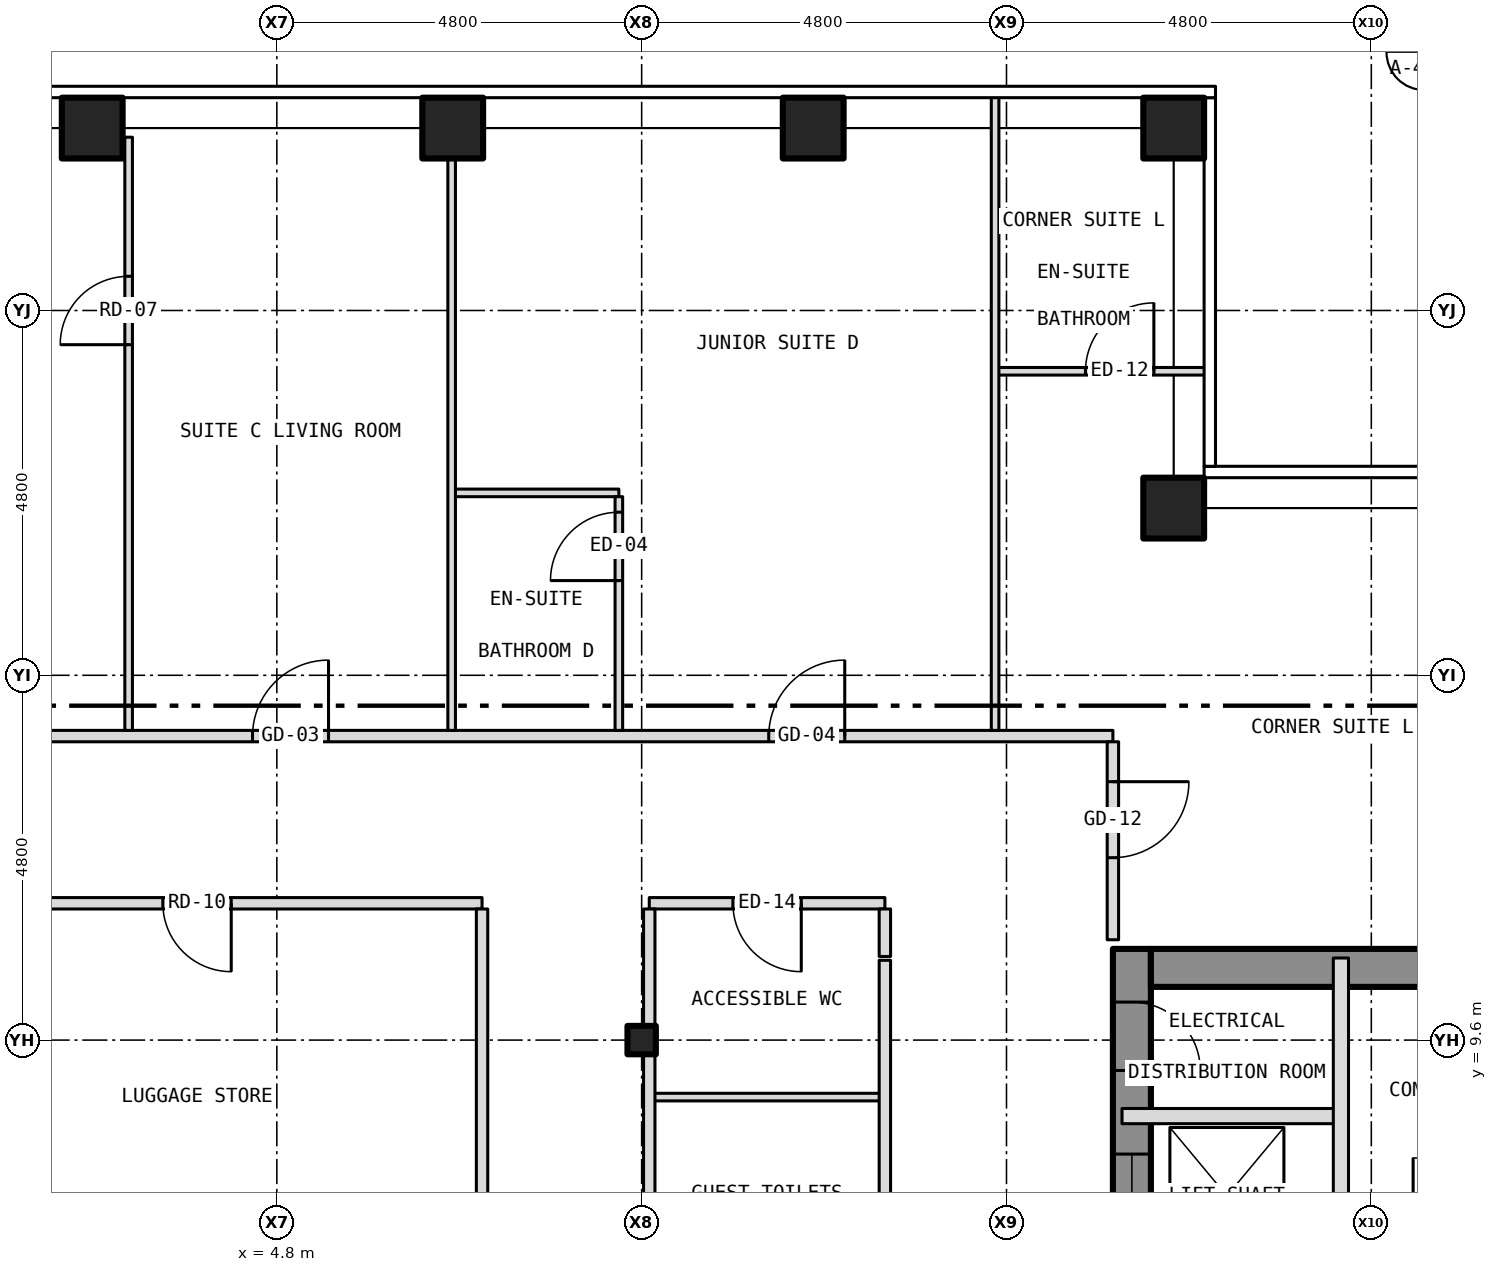
"""IFC4 building model, lengths in metres.
Left out: names, types, materials, properties, quantities, classifications, styles, units other than length and angle.
Written with IfcOpenShell. Run it as: python <this file> out.ifc"""

import sys

from ifc_helpers import new_model, si_unit, direction, frame, frame_2d, origin, origin_2d, place, context, subcontext, project, spatial, rectangle, hollow_rectangle, i_section, extrude, element, fill, save


model = new_model("IFC4")
c1 = context("Model", 3, precision=1e-05, world=origin(), true_north=direction((0.0, 1.0)))
c2 = subcontext(c1, "Body", "Model", "MODEL_VIEW")
j1 = project(units=[si_unit("LENGTHUNIT", "METRE"), si_unit("PLANEANGLEUNIT", "RADIAN")], contexts=[c1])
p1 = place(None, origin())
s1 = spatial("IfcSite", under=j1, at=p1, CompositionType="ELEMENT")
p2 = place(p1, origin())
s2 = spatial("IfcBuilding", under=s1, at=p2, CompositionType="ELEMENT")
p3 = place(p2, frame((0.0, 0.0, 172.5)))
s3 = spatial("IfcBuildingStorey", under=s2, at=p3, CompositionType="ELEMENT", Elevation=172.5)
for number, where, z_axis, x_axis in (
    (1, (2.371, 21.6, -0.15), (0.0, 0.0, 1.0), (1.0, 0.0, 0.0)),
    (2, (7.114, 21.6, -0.15), (0.0, 0.0, 1.0), (1.0, 0.0, 0.0)),
    (3, (11.857, 21.6, -0.15), (0.0, 0.0, 1.0), (1.0, 0.0, 0.0)),
    (4, (16.6, 21.6, -0.15), (0.0, 0.0, 1.0), (1.0, 0.0, 0.0)),
    (5, (16.6, 16.6, -0.15), (0.0, 0.0, 1.0), (1.0, 0.0, 0.0)),
):
    element("IfcColumn", number, at=place(p3, frame(where, z_axis=z_axis, x_axis=x_axis)), inside=s3, PredefinedType="COLUMN", context=c2, shape_type="SweptSolid", body=[
        extrude(hollow_rectangle(XDim=0.8, YDim=0.8, WallThickness=0.045, at=origin_2d()), origin(), (0.0, 0.0, 1.0), 3.5),
    ])
p4 = place(p3, frame((9.6, 9.6, -0.15), z_axis=(0.0, 0.0, 1.0), x_axis=(1.0, 0.0, 0.0)))
e6 = element("IfcColumn", 6, at=p4, inside=s3, PredefinedType="COLUMN", context=c2, shape_type="SweptSolid", body=[
    extrude(i_section(OverallWidth=0.373, OverallDepth=0.373, WebThickness=0.016, FlangeThickness=0.026, at=origin_2d()), origin(), (0.0, 0.0, 1.0), 3.5),
])
p5 = place(p3, frame((16.05, -10.8, 0.0), z_axis=(0.0, 0.0, 1.0), x_axis=(0.0, 1.0, 0.0)))
e7 = element("IfcWall", 7, at=p5, inside=s3, PredefinedType="SHEAR", context=c2, shape_type="SweptSolid", body=[
    extrude(rectangle(XDim=21.6, YDim=0.5, at=frame_2d((10.8, 0.0))), origin(), (0.0, 0.0, 1.0), 3.25),
])
p6 = place(p5, frame((9.4, 0.0, 0.0)))
e8 = element("IfcOpeningElement", 8, at=p6, cuts=e7, PredefinedType="OPENING", context=c2, shape_type="SweptSolid", body=[
    extrude(rectangle(XDim=1.1, YDim=2.1, at=frame_2d((0.55, 1.05))), frame((0.0, 0.262, 0.0), z_axis=(0.0, -1.0, 0.0), x_axis=(1.0, 0.0, 0.0)), (0.0, 0.0, 1.0), 0.524),
])
p7 = place(p5, frame((11.5, 0.0, 0.0)))
e9 = element("IfcOpeningElement", 9, at=p7, cuts=e7, PredefinedType="OPENING", context=c2, shape_type="SweptSolid", body=[
    extrude(rectangle(XDim=1.1, YDim=2.1, at=frame_2d((0.55, 1.05))), frame((0.0, 0.262, 0.0), z_axis=(0.0, -1.0, 0.0), x_axis=(1.0, 0.0, 0.0)), (0.0, 0.0, 1.0), 0.524),
])
p8 = place(p5, frame((13.6, 0.0, 0.0)))
e10 = element("IfcOpeningElement", 10, at=p8, cuts=e7, PredefinedType="OPENING", context=c2, shape_type="SweptSolid", body=[
    extrude(rectangle(XDim=1.1, YDim=2.1, at=frame_2d((0.55, 1.05))), frame((0.0, 0.262, 0.0), z_axis=(0.0, -1.0, 0.0), x_axis=(1.0, 0.0, 0.0)), (0.0, 0.0, 1.0), 0.524),
])
p9 = place(p5, frame((15.7, 0.0, 0.0)))
e11 = element("IfcOpeningElement", 11, at=p9, cuts=e7, PredefinedType="OPENING", context=c2, shape_type="SweptSolid", body=[
    extrude(rectangle(XDim=1.1, YDim=2.1, at=frame_2d((0.55, 1.05))), frame((0.0, 0.262, 0.0), z_axis=(0.0, -1.0, 0.0), x_axis=(1.0, 0.0, 0.0)), (0.0, 0.0, 1.0), 0.524),
])
p10 = place(p5, frame((17.8, 0.0, 0.0)))
e12 = element("IfcOpeningElement", 12, at=p10, cuts=e7, PredefinedType="OPENING", context=c2, shape_type="SweptSolid", body=[
    extrude(rectangle(XDim=1.1, YDim=2.1, at=frame_2d((0.55, 1.05))), frame((0.0, 0.262, 0.0), z_axis=(0.0, -1.0, 0.0), x_axis=(1.0, 0.0, 0.0)), (0.0, 0.0, 1.0), 0.524),
])
p11 = place(p5, frame((5.642, 0.0, 0.0)))
e13 = element("IfcOpeningElement", 13, at=p11, cuts=e7, PredefinedType="OPENING", context=c2, shape_type="SweptSolid", body=[
    extrude(rectangle(XDim=1.1, YDim=2.1, at=frame_2d((0.55, 1.05))), frame((0.0, 0.262, 0.0), z_axis=(0.0, -1.0, 0.0), x_axis=(1.0, 0.0, 0.0)), (0.0, 0.0, 1.0), 0.524),
])
p12 = place(p5, frame((7.5, 0.0, 0.0)))
e14 = element("IfcOpeningElement", 14, at=p12, cuts=e7, PredefinedType="OPENING", context=c2, shape_type="SweptSolid", body=[
    extrude(rectangle(XDim=1.1, YDim=2.1, at=frame_2d((0.55, 1.05))), frame((0.0, 0.262, 0.0), z_axis=(0.0, -1.0, 0.0), x_axis=(1.0, 0.0, 0.0)), (0.0, 0.0, 1.0), 0.524),
])
p13 = place(p5, frame((20.0, 0.0, 0.0)))
e15 = element("IfcOpeningElement", 15, at=p13, cuts=e7, PredefinedType="OPENING", context=c2, shape_type="SweptSolid", body=[
    extrude(rectangle(XDim=0.9, YDim=2.1, at=frame_2d((0.45, 1.05))), frame((0.0, 0.262, 0.0), z_axis=(0.0, -1.0, 0.0), x_axis=(1.0, 0.0, 0.0)), (0.0, 0.0, 1.0), 0.524),
])
p14 = place(p3, frame((16.3, 10.55, 0.0), z_axis=(0.0, 0.0, 1.0), x_axis=(1.0, 0.0, 0.0)))
e16 = element("IfcWall", 16, at=p14, inside=s3, PredefinedType="SHEAR", context=c2, shape_type="SweptSolid", body=[
    extrude(rectangle(XDim=4.8, YDim=0.5, at=frame_2d((2.4, 0.0))), origin(), (0.0, 0.0, 1.0), 3.25),
])
p15 = place(p3, frame((15.92, 8.6, 0.0), z_axis=(0.0, 0.0, 1.0), x_axis=(1.0, 0.0, 0.0)))
e17 = element("IfcWall", 17, at=p15, inside=s3, PredefinedType="PARTITIONING", context=c2, shape_type="SweptSolid", body=[
    extrude(rectangle(XDim=2.88, YDim=0.2, at=frame_2d((1.44, 0.0))), origin(), (0.0, 0.0, 1.0), 3.25),
])
p16 = place(p3, frame((9.7, 8.85, 0.0), z_axis=(0.0, 0.0, 1.0), x_axis=(1.0, 0.0, 0.0)))
e18 = element("IfcWall", 18, at=p16, inside=s3, PredefinedType="PARTITIONING", context=c2, shape_type="SweptSolid", body=[
    extrude(rectangle(XDim=3.1, YDim=0.1, at=frame_2d((1.55, 0.0))), origin(), (0.0, 0.0, 1.0), 3.35),
])
p17 = place(p3, frame((-12.8, 11.4, 0.0), z_axis=(0.0, 0.0, 1.0), x_axis=(1.0, 0.0, 0.0)))
e19 = element("IfcWall", 19, at=p17, inside=s3, PredefinedType="PARTITIONING", context=c2, shape_type="SweptSolid", body=[
    extrude(rectangle(XDim=20.3, YDim=0.15, at=frame_2d((10.15, 0.0))), origin(), (0.0, 0.0, 1.0), 3.35),
])
p18 = place(p17, frame((1.15, 0.0, 0.0)))
e20 = element("IfcOpeningElement", 20, at=p18, cuts=e19, PredefinedType="OPENING", context=c2, shape_type="SweptSolid", body=[
    extrude(rectangle(XDim=0.9, YDim=2.1, at=frame_2d((0.45, 1.05))), frame((0.0, 0.087, 0.0), z_axis=(0.0, -1.0, 0.0), x_axis=(1.0, 0.0, 0.0)), (0.0, 0.0, 1.0), 0.174),
])
p19 = place(p17, frame((16.1, 0.0, 0.0)))
e21 = element("IfcOpeningElement", 21, at=p19, cuts=e19, PredefinedType="OPENING", context=c2, shape_type="SweptSolid", body=[
    extrude(rectangle(XDim=0.9, YDim=2.1, at=frame_2d((0.45, 1.05))), frame((0.0, 0.087, 0.0), z_axis=(0.0, -1.0, 0.0), x_axis=(1.0, 0.0, 0.0)), (0.0, 0.0, 1.0), 0.174),
])
p20 = place(p17, frame((7.55, 0.0, 0.0)))
e22 = element("IfcOpeningElement", 22, at=p20, cuts=e19, PredefinedType="OPENING", context=c2, shape_type="SweptSolid", body=[
    extrude(rectangle(XDim=0.9, YDim=2.1, at=frame_2d((0.45, 1.05))), frame((0.0, 0.087, 0.0), z_axis=(0.0, -1.0, 0.0), x_axis=(1.0, 0.0, 0.0)), (0.0, 0.0, 1.0), 0.174),
])
p21 = place(p3, frame((9.7, 11.4, 0.0), z_axis=(0.0, 0.0, 1.0), x_axis=(1.0, 0.0, 0.0)))
e23 = element("IfcWall", 23, at=p21, inside=s3, PredefinedType="PARTITIONING", context=c2, shape_type="SweptSolid", body=[
    extrude(rectangle(XDim=3.1, YDim=0.15, at=frame_2d((1.55, 0.0))), origin(), (0.0, 0.0, 1.0), 3.35),
])
p22 = place(p21, frame((1.1, 0.0, 0.0)))
e24 = element("IfcOpeningElement", 24, at=p22, cuts=e23, PredefinedType="OPENING", context=c2, shape_type="SweptSolid", body=[
    extrude(rectangle(XDim=0.9, YDim=2.1, at=frame_2d((0.45, 1.05))), frame((0.0, 0.087, 0.0), z_axis=(0.0, -1.0, 0.0), x_axis=(1.0, 0.0, 0.0)), (0.0, 0.0, 1.0), 0.174),
])
p23 = place(p3, frame((-15.8, 13.6, 0.0), z_axis=(0.0, 0.0, 1.0), x_axis=(1.0, 0.0, 0.0)))
e25 = element("IfcWall", 25, at=p23, inside=s3, PredefinedType="PARTITIONING", context=c2, shape_type="SweptSolid", body=[
    extrude(rectangle(XDim=31.6, YDim=0.15, at=frame_2d((15.8, 0.0))), origin(), (0.0, 0.0, 1.0), 3.35),
])
p24 = place(p23, frame((4.543, 0.0, 0.0)))
e26 = element("IfcOpeningElement", 26, at=p24, cuts=e25, PredefinedType="OPENING", context=c2, shape_type="SweptSolid", body=[
    extrude(rectangle(XDim=1.0, YDim=2.1, at=frame_2d((0.5, 1.05))), frame((0.0, 0.087, 0.0), z_axis=(0.0, -1.0, 0.0), x_axis=(1.0, 0.0, 0.0)), (0.0, 0.0, 1.0), 0.174),
])
p25 = place(p23, frame((8.271, 0.0, 0.0)))
e27 = element("IfcOpeningElement", 27, at=p25, cuts=e25, PredefinedType="OPENING", context=c2, shape_type="SweptSolid", body=[
    extrude(rectangle(XDim=1.0, YDim=2.1, at=frame_2d((0.5, 1.05))), frame((0.0, 0.087, 0.0), z_axis=(0.0, -1.0, 0.0), x_axis=(1.0, 0.0, 0.0)), (0.0, 0.0, 1.0), 0.174),
])
p26 = place(p23, frame((20.28, 0.0, 0.0)))
e28 = element("IfcOpeningElement", 28, at=p26, cuts=e25, PredefinedType="OPENING", context=c2, shape_type="SweptSolid", body=[
    extrude(rectangle(XDim=1.0, YDim=2.1, at=frame_2d((0.5, 1.05))), frame((0.0, 0.087, 0.0), z_axis=(0.0, -1.0, 0.0), x_axis=(1.0, 0.0, 0.0)), (0.0, 0.0, 1.0), 0.174),
])
p27 = place(p23, frame((27.072, 0.0, 0.0)))
e29 = element("IfcOpeningElement", 29, at=p27, cuts=e25, PredefinedType="OPENING", context=c2, shape_type="SweptSolid", body=[
    extrude(rectangle(XDim=1.0, YDim=2.1, at=frame_2d((0.5, 1.05))), frame((0.0, 0.087, 0.0), z_axis=(0.0, -1.0, 0.0), x_axis=(1.0, 0.0, 0.0)), (0.0, 0.0, 1.0), 0.174),
])
p28 = place(p3, frame((7.1, 16.8, 0.0), z_axis=(0.0, 0.0, 1.0), x_axis=(1.0, 0.0, 0.0)))
e30 = element("IfcWall", 30, at=p28, inside=s3, PredefinedType="PARTITIONING", context=c2, shape_type="SweptSolid", body=[
    extrude(rectangle(XDim=2.2, YDim=0.1, at=frame_2d((1.1, 0.0))), origin(), (0.0, 0.0, 1.0), 3.35),
])
p29 = place(p3, frame((14.25, 18.4, 0.0), z_axis=(0.0, 0.0, 1.0), x_axis=(1.0, 0.0, 0.0)))
e31 = element("IfcWall", 31, at=p29, inside=s3, PredefinedType="PARTITIONING", context=c2, shape_type="SweptSolid", body=[
    extrude(rectangle(XDim=2.78, YDim=0.1, at=frame_2d((1.39, 0.0))), origin(), (0.0, 0.0, 1.0), 3.35),
])
p30 = place(p29, frame((1.189, 0.0, 0.0)))
e32 = element("IfcOpeningElement", 32, at=p30, cuts=e31, PredefinedType="OPENING", context=c2, shape_type="SweptSolid", body=[
    extrude(rectangle(XDim=0.9, YDim=2.1, at=frame_2d((0.45, 1.05))), frame((0.0, 0.062, 0.0), z_axis=(0.0, -1.0, 0.0), x_axis=(1.0, 0.0, 0.0)), (0.0, 0.0, 1.0), 0.124),
])
p31 = place(p3, frame((2.85, 13.675, 0.0), z_axis=(0.0, 0.0, 1.0), x_axis=(0.0, 1.0, 0.0)))
e33 = element("IfcWall", 33, at=p31, inside=s3, PredefinedType="PARTITIONING", context=c2, shape_type="SweptSolid", body=[
    extrude(rectangle(XDim=7.805, YDim=0.1, at=frame_2d((3.902, 0.0))), origin(), (0.0, 0.0, 1.0), 3.35),
])
p32 = place(p31, frame((5.075, 0.0, 0.0)))
e34 = element("IfcOpeningElement", 34, at=p32, cuts=e33, PredefinedType="OPENING", context=c2, shape_type="SweptSolid", body=[
    extrude(rectangle(XDim=0.9, YDim=2.1, at=frame_2d((0.45, 1.05))), frame((0.0, 0.062, 0.0), z_axis=(0.0, -1.0, 0.0), x_axis=(1.0, 0.0, 0.0)), (0.0, 0.0, 1.0), 0.124),
])
p33 = place(p3, frame((7.1, 13.675, 0.0), z_axis=(0.0, 0.0, 1.0), x_axis=(0.0, 1.0, 0.0)))
e35 = element("IfcWall", 35, at=p33, inside=s3, PredefinedType="PARTITIONING", context=c2, shape_type="SweptSolid", body=[
    extrude(rectangle(XDim=7.805, YDim=0.1, at=frame_2d((3.902, 0.0))), origin(), (0.0, 0.0, 1.0), 3.35),
])
p34 = place(p3, frame((7.5, 6.375, 0.0), z_axis=(0.0, 0.0, 1.0), x_axis=(0.0, 1.0, 0.0)))
e36 = element("IfcWall", 36, at=p34, inside=s3, PredefinedType="PARTITIONING", context=c2, shape_type="SweptSolid", body=[
    extrude(rectangle(XDim=4.95, YDim=0.15, at=frame_2d((2.475, 0.0))), origin(), (0.0, 0.0, 1.0), 3.35),
])
p35 = place(p3, frame((9.3, 13.675, 0.0), z_axis=(0.0, 0.0, 1.0), x_axis=(0.0, 1.0, 0.0)))
e37 = element("IfcWall", 37, at=p35, inside=s3, PredefinedType="PARTITIONING", context=c2, shape_type="SweptSolid", body=[
    extrude(rectangle(XDim=3.075, YDim=0.1, at=frame_2d((1.538, 0.0))), origin(), (0.0, 0.0, 1.0), 3.35),
])
p36 = place(p35, frame((1.971, 0.0, 0.0)))
e38 = element("IfcOpeningElement", 38, at=p36, cuts=e37, PredefinedType="OPENING", context=c2, shape_type="SweptSolid", body=[
    extrude(rectangle(XDim=0.9, YDim=2.1, at=frame_2d((0.45, 1.05))), frame((0.0, 0.062, 0.0), z_axis=(0.0, -1.0, 0.0), x_axis=(1.0, 0.0, 0.0)), (0.0, 0.0, 1.0), 0.124),
])
p37 = place(p3, frame((9.7, 6.375, 0.0), z_axis=(0.0, 0.0, 1.0), x_axis=(0.0, 1.0, 0.0)))
e39 = element("IfcWall", 39, at=p37, inside=s3, PredefinedType="PARTITIONING", context=c2, shape_type="SweptSolid", body=[
    extrude(rectangle(XDim=3.038, YDim=0.15, at=frame_2d((1.519, 0.0))), origin(), (0.0, 0.0, 1.0), 2.728),
])
p38 = place(p3, frame((9.7, 9.413, 0.0), z_axis=(0.0, 0.0, 1.0), x_axis=(0.0, 1.0, 0.0)))
e40 = element("IfcWall", 40, at=p38, inside=s3, PredefinedType="PARTITIONING", context=c2, shape_type="SweptSolid", body=[
    extrude(rectangle(XDim=0.374, YDim=0.15, at=frame_2d((0.187, 0.0))), origin(), (0.0, 0.0, 1.0), 3.35),
])
p39 = place(p3, frame((9.7, 9.787, 0.0), z_axis=(0.0, 0.0, 1.0), x_axis=(0.0, 1.0, 0.0)))
e41 = element("IfcWall", 41, at=p39, inside=s3, PredefinedType="PARTITIONING", context=c2, shape_type="SweptSolid", body=[
    extrude(rectangle(XDim=1.538, YDim=0.15, at=frame_2d((0.769, 0.0))), origin(), (0.0, 0.0, 1.0), 2.728),
])
p40 = place(p3, frame((12.8, 6.35, 0.0), z_axis=(0.0, 0.0, 1.0), x_axis=(0.0, 1.0, 0.0)))
e42 = element("IfcWall", 42, at=p40, inside=s3, PredefinedType="PARTITIONING", context=c2, shape_type="SweptSolid", body=[
    extrude(rectangle(XDim=4.3, YDim=0.15, at=frame_2d((2.15, 0.0))), origin(), (0.0, 0.0, 1.0), 3.35),
])
p41 = place(p3, frame((12.8, 10.7, 0.0), z_axis=(0.0, 0.0, 1.0), x_axis=(0.0, 1.0, 0.0)))
e43 = element("IfcWall", 43, at=p41, inside=s3, PredefinedType="PARTITIONING", context=c2, shape_type="SweptSolid", body=[
    extrude(rectangle(XDim=0.625, YDim=0.15, at=frame_2d((0.312, 0.0))), origin(), (0.0, 0.0, 1.0), 3.35),
])
p42 = place(p3, frame((14.25, 13.675, 0.0), z_axis=(0.0, 0.0, 1.0), x_axis=(0.0, 1.0, 0.0)))
e44 = element("IfcWall", 44, at=p42, inside=s3, PredefinedType="PARTITIONING", context=c2, shape_type="SweptSolid", body=[
    extrude(rectangle(XDim=8.355, YDim=0.1, at=frame_2d((4.177, 0.0))), origin(), (0.0, 0.0, 1.0), 2.817),
])
p43 = place(p3, frame((15.8, 10.92, 0.0), z_axis=(0.0, 0.0, 1.0), x_axis=(0.0, 1.0, 0.0)))
e45 = element("IfcWall", 45, at=p43, inside=s3, PredefinedType="PARTITIONING", context=c2, shape_type="SweptSolid", body=[
    extrude(rectangle(XDim=2.605, YDim=0.15, at=frame_2d((1.302, 0.0))), origin(), (0.0, 0.0, 1.0), 3.35),
])
p44 = place(p43, frame((1.08, 0.0, 0.0)))
e46 = element("IfcOpeningElement", 46, at=p44, cuts=e45, PredefinedType="OPENING", context=c2, shape_type="SweptSolid", body=[
    extrude(rectangle(XDim=1.0, YDim=2.1, at=frame_2d((0.5, 1.05))), frame((0.0, 0.087, 0.0), z_axis=(0.0, -1.0, 0.0), x_axis=(1.0, 0.0, 0.0)), (0.0, 0.0, 1.0), 0.174),
])
p45 = place(p3, frame((18.8, -1.8, 0.0), z_axis=(0.0, 0.0, 1.0), x_axis=(0.0, 1.0, 0.0)))
e47 = element("IfcWall", 47, at=p45, inside=s3, PredefinedType="PARTITIONING", context=c2, shape_type="SweptSolid", body=[
    extrude(rectangle(XDim=12.48, YDim=0.2, at=frame_2d((6.24, 0.0))), origin(), (0.0, 0.0, 1.0), 3.25),
])
p46 = place(p10, origin())
e48 = element("IfcDoor", 48, at=p46, inside=s3, OperationType="SLIDING_TO_LEFT", PredefinedType="DOOR", context=c2, shape_type="SweptSolid", body=[
    extrude(rectangle(XDim=1.1, YDim=2.1, at=frame_2d((0.55, 1.05))), frame((0.0, 0.025, 0.0), z_axis=(0.0, -1.0, 0.0), x_axis=(1.0, 0.0, 0.0)), (0.0, 0.0, 1.0), 0.05),
])
fill(e12, e48)
p47 = place(p13, origin())
e49 = element("IfcDoor", 49, at=p47, inside=s3, OperationType="SINGLE_SWING_LEFT", PredefinedType="DOOR", context=c2, shape_type="SweptSolid", body=[
    extrude(rectangle(XDim=0.9, YDim=2.1, at=frame_2d((0.45, 1.05))), frame((0.0, 0.025, 0.0), z_axis=(0.0, -1.0, 0.0), x_axis=(1.0, 0.0, 0.0)), (0.0, 0.0, 1.0), 0.05),
])
fill(e15, e49)
p48 = place(p26, origin())
e50 = element("IfcDoor", 50, at=p48, inside=s3, OperationType="SINGLE_SWING_RIGHT", PredefinedType="DOOR", context=c2, shape_type="SweptSolid", body=[
    extrude(rectangle(XDim=1.0, YDim=2.1, at=frame_2d((0.5, 1.05))), frame((0.0, 0.025, 0.0), z_axis=(0.0, -1.0, 0.0), x_axis=(1.0, 0.0, 0.0)), (0.0, 0.0, 1.0), 0.05),
])
fill(e28, e50)
p49 = place(p32, origin())
e51 = element("IfcDoor", 51, at=p49, inside=s3, OperationType="SINGLE_SWING_LEFT", PredefinedType="DOOR", context=c2, shape_type="SweptSolid", body=[
    extrude(rectangle(XDim=0.9, YDim=2.1, at=frame_2d((0.45, 1.05))), frame((0.0, 0.025, 0.0), z_axis=(0.0, -1.0, 0.0), x_axis=(1.0, 0.0, 0.0)), (0.0, 0.0, 1.0), 0.05),
])
fill(e34, e51)
p50 = place(p27, origin())
e52 = element("IfcDoor", 52, at=p50, inside=s3, OperationType="SINGLE_SWING_RIGHT", PredefinedType="DOOR", context=c2, shape_type="SweptSolid", body=[
    extrude(rectangle(XDim=1.0, YDim=2.1, at=frame_2d((0.5, 1.05))), frame((0.0, 0.025, 0.0), z_axis=(0.0, -1.0, 0.0), x_axis=(1.0, 0.0, 0.0)), (0.0, 0.0, 1.0), 0.05),
])
fill(e29, e52)
p51 = place(p36, origin())
e53 = element("IfcDoor", 53, at=p51, inside=s3, OperationType="SINGLE_SWING_LEFT", PredefinedType="DOOR", context=c2, shape_type="SweptSolid", body=[
    extrude(rectangle(XDim=0.9, YDim=2.1, at=frame_2d((0.45, 1.05))), frame((0.0, 0.025, 0.0), z_axis=(0.0, -1.0, 0.0), x_axis=(1.0, 0.0, 0.0)), (0.0, 0.0, 1.0), 0.05),
])
fill(e38, e53)
p52 = place(p30, origin())
e54 = element("IfcDoor", 54, at=p52, inside=s3, OperationType="SINGLE_SWING_RIGHT", PredefinedType="DOOR", context=c2, shape_type="SweptSolid", body=[
    extrude(rectangle(XDim=0.9, YDim=2.1, at=frame_2d((0.45, 1.05))), frame((0.0, 0.025, 0.0), z_axis=(0.0, -1.0, 0.0), x_axis=(1.0, 0.0, 0.0)), (0.0, 0.0, 1.0), 0.05),
])
fill(e32, e54)
p53 = place(p44, origin())
e55 = element("IfcDoor", 55, at=p53, inside=s3, OperationType="SINGLE_SWING_RIGHT", PredefinedType="DOOR", context=c2, shape_type="SweptSolid", body=[
    extrude(rectangle(XDim=1.0, YDim=2.1, at=frame_2d((0.5, 1.05))), frame((0.0, 0.025, 0.0), z_axis=(0.0, -1.0, 0.0), x_axis=(1.0, 0.0, 0.0)), (0.0, 0.0, 1.0), 0.05),
])
fill(e46, e55)
p54 = place(p22, origin())
e56 = element("IfcDoor", 56, at=p54, inside=s3, OperationType="SINGLE_SWING_RIGHT", PredefinedType="DOOR", context=c2, shape_type="SweptSolid", body=[
    extrude(rectangle(XDim=0.9, YDim=2.1, at=frame_2d((0.45, 1.05))), frame((0.0, 0.025, 0.0), z_axis=(0.0, -1.0, 0.0), x_axis=(1.0, 0.0, 0.0)), (0.0, 0.0, 1.0), 0.05),
])
fill(e24, e56)
p55 = place(p19, origin())
e57 = element("IfcDoor", 57, at=p55, inside=s3, OperationType="SINGLE_SWING_RIGHT", PredefinedType="DOOR", context=c2, shape_type="SweptSolid", body=[
    extrude(rectangle(XDim=0.9, YDim=2.1, at=frame_2d((0.45, 1.05))), frame((0.0, 0.025, 0.0), z_axis=(0.0, -1.0, 0.0), x_axis=(1.0, 0.0, 0.0)), (0.0, 0.0, 1.0), 0.05),
])
fill(e21, e57)
save(model, sys.argv[1])
